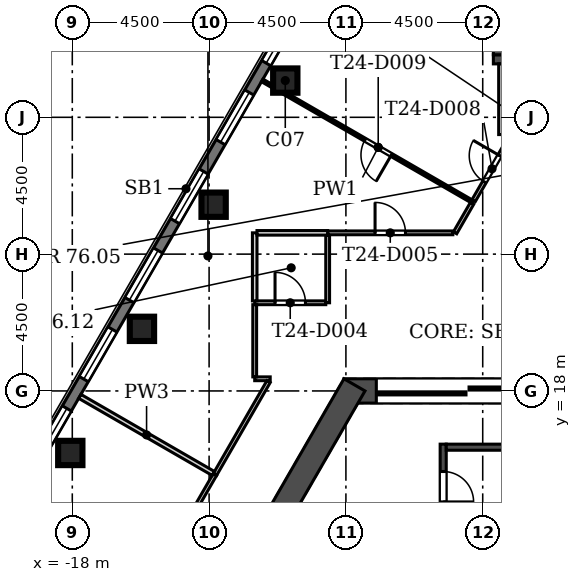
"""IFC4 building model, lengths in metres.
Left out: names, types, materials, properties, quantities, classifications, styles, units other than length and angle.
Written with IfcOpenShell. Run it as: python <this file> out.ifc"""

import sys

from ifc_helpers import new_model, si_unit, direction, frame, frame_2d, origin, origin_2d, place, context, subcontext, project, spatial, rectangle, extrude, element, fill, save


model = new_model("IFC4")
c1 = context("Model", 3, precision=1e-05, world=origin(), true_north=direction((0.0, 1.0)))
c2 = subcontext(c1, "Body", "Model", "MODEL_VIEW")
j1 = project(units=[si_unit("LENGTHUNIT", "METRE"), si_unit("PLANEANGLEUNIT", "RADIAN")], contexts=[c1])
p1 = place(None, origin())
s1 = spatial("IfcSite", under=j1, at=p1, CompositionType="ELEMENT")
p2 = place(p1, origin())
s2 = spatial("IfcBuilding", under=s1, at=p2, CompositionType="ELEMENT")
p3 = place(p2, frame((0.0, 0.0, 335.1)))
s3 = spatial("IfcBuildingStorey", under=s2, at=p3, CompositionType="ELEMENT", Elevation=335.1)
for number, where, z_axis, x_axis in (
    (1, (-10.994, 28.208, 0.0), (0.0, 0.0, 1.0), (1.0, 0.0, 0.0)),
    (2, (-13.352, 24.125, 0.0), (0.0, 0.0, 1.0), (1.0, 0.0, 0.0)),
    (3, (-15.709, 20.042, 0.0), (0.0, 0.0, 1.0), (1.0, 0.0, 0.0)),
    (4, (-18.066, 15.96, 0.0), (0.0, 0.0, 1.0), (1.0, 0.0, 0.0)),
):
    element("IfcColumn", number, at=place(p3, frame(where, z_axis=z_axis, x_axis=x_axis)), inside=s3, PredefinedType="COLUMN", context=c2, shape_type="SweptSolid", body=[
        extrude(rectangle(XDim=0.8, YDim=0.8, at=origin_2d()), origin(), (0.0, 0.0, 1.0), 4.2),
    ])
p4 = place(p3, frame((9.065, 18.0, 0.0), z_axis=(0.0, 0.0, 1.0), x_axis=(-1.0, 0.0, 0.0)))
e5 = element("IfcWall", 5, at=p4, inside=s3, PredefinedType="SHEAR", context=c2, shape_type="SweptSolid", body=[
    extrude(rectangle(XDim=18.13, YDim=0.8, at=frame_2d((9.065, 0.0))), origin(), (0.0, 0.0, 1.0), 4.2),
])
p5 = place(p4, frame((8.365, 0.0, 0.0)))
e6 = element("IfcOpeningElement", 6, at=p5, cuts=e5, PredefinedType="OPENING", context=c2, shape_type="SweptSolid", body=[
    extrude(rectangle(XDim=1.4, YDim=2.1, at=frame_2d((0.7, 1.05))), frame((0.0, 0.41, 0.0), z_axis=(0.0, -1.0, 0.0), x_axis=(1.0, 0.0, 0.0)), (0.0, 0.0, 1.0), 0.82),
])
p6 = place(p4, frame((11.065, 0.0, 0.0)))
e7 = element("IfcOpeningElement", 7, at=p6, cuts=e5, PredefinedType="OPENING", context=c2, shape_type="SweptSolid", body=[
    extrude(rectangle(XDim=6.0, YDim=2.4, at=frame_2d((3.0, 1.2))), frame((0.0, 0.41, 0.0), z_axis=(0.0, -1.0, 0.0), x_axis=(1.0, 0.0, 0.0)), (0.0, 0.0, 1.0), 0.82),
])
p7 = place(p4, frame((1.065, 0.0, 0.0)))
e8 = element("IfcOpeningElement", 8, at=p7, cuts=e5, PredefinedType="OPENING", context=c2, shape_type="SweptSolid", body=[
    extrude(rectangle(XDim=6.0, YDim=2.4, at=frame_2d((3.0, 1.2))), frame((0.0, 0.41, 0.0), z_axis=(0.0, -1.0, 0.0), x_axis=(1.0, 0.0, 0.0)), (0.0, 0.0, 1.0), 0.82),
])
p8 = place(p3, frame((-8.719, 18.2, 0.0), z_axis=(0.0, 0.0, 1.0), x_axis=(-0.500015780397, -0.866016292776, 0.0)))
e9 = element("IfcWall", 9, at=p8, inside=s3, PredefinedType="SHEAR", context=c2, shape_type="SweptSolid", body=[
    extrude(rectangle(XDim=8.67, YDim=0.8, at=frame_2d((4.335, 0.0))), origin(), (0.0, 0.0, 1.0), 4.2),
])
p9 = place(p3, frame((-4.353, 41.372, 0.0), z_axis=(0.0, 0.0, 1.0), x_axis=(-0.500001731347, -0.866024404189, 0.0)))
e10 = element("IfcWall", 10, at=p9, inside=s3, PredefinedType="SOLIDWALL", context=c2, shape_type="SweptSolid", body=[
    extrude(rectangle(XDim=38.87, YDim=0.34, at=frame_2d((19.435, 0.0))), origin(), (0.0, 0.0, 1.0), 3.8),
])
p10 = place(p9, frame((3.653, 0.0, 0.9)))
e11 = element("IfcOpeningElement", 11, at=p10, cuts=e10, PredefinedType="OPENING", context=c2, shape_type="SweptSolid", body=[
    extrude(rectangle(XDim=1.885, YDim=2.6, at=frame_2d((0.942, 1.3))), frame((0.0, 0.18, 0.0), z_axis=(0.0, -1.0, 0.0), x_axis=(1.0, 0.0, 0.0)), (0.0, 0.0, 1.0), 0.36),
])
p11 = place(p9, frame((6.653, 0.0, 0.9)))
e12 = element("IfcOpeningElement", 12, at=p11, cuts=e10, PredefinedType="OPENING", context=c2, shape_type="SweptSolid", body=[
    extrude(rectangle(XDim=1.885, YDim=2.6, at=frame_2d((0.942, 1.3))), frame((0.0, 0.18, 0.0), z_axis=(0.0, -1.0, 0.0), x_axis=(1.0, 0.0, 0.0)), (0.0, 0.0, 1.0), 0.36),
])
p12 = place(p9, frame((9.653, 0.0, 0.9)))
e13 = element("IfcOpeningElement", 13, at=p12, cuts=e10, PredefinedType="OPENING", context=c2, shape_type="SweptSolid", body=[
    extrude(rectangle(XDim=1.885, YDim=2.6, at=frame_2d((0.942, 1.3))), frame((0.0, 0.18, 0.0), z_axis=(0.0, -1.0, 0.0), x_axis=(1.0, 0.0, 0.0)), (0.0, 0.0, 1.0), 0.36),
])
p13 = place(p9, frame((12.653, 0.0, 0.9)))
e14 = element("IfcOpeningElement", 14, at=p13, cuts=e10, PredefinedType="OPENING", context=c2, shape_type="SweptSolid", body=[
    extrude(rectangle(XDim=1.885, YDim=2.6, at=frame_2d((0.942, 1.3))), frame((0.0, 0.18, 0.0), z_axis=(0.0, -1.0, 0.0), x_axis=(1.0, 0.0, 0.0)), (0.0, 0.0, 1.0), 0.36),
])
p14 = place(p9, frame((15.653, 0.0, 0.9)))
e15 = element("IfcOpeningElement", 15, at=p14, cuts=e10, PredefinedType="OPENING", context=c2, shape_type="SweptSolid", body=[
    extrude(rectangle(XDim=1.885, YDim=2.6, at=frame_2d((0.942, 1.3))), frame((0.0, 0.18, 0.0), z_axis=(0.0, -1.0, 0.0), x_axis=(1.0, 0.0, 0.0)), (0.0, 0.0, 1.0), 0.36),
])
p15 = place(p9, frame((18.653, 0.0, 0.9)))
e16 = element("IfcOpeningElement", 16, at=p15, cuts=e10, PredefinedType="OPENING", context=c2, shape_type="SweptSolid", body=[
    extrude(rectangle(XDim=1.885, YDim=2.6, at=frame_2d((0.942, 1.3))), frame((0.0, 0.18, 0.0), z_axis=(0.0, -1.0, 0.0), x_axis=(1.0, 0.0, 0.0)), (0.0, 0.0, 1.0), 0.36),
])
p16 = place(p9, frame((21.653, 0.0, 0.9)))
e17 = element("IfcOpeningElement", 17, at=p16, cuts=e10, PredefinedType="OPENING", context=c2, shape_type="SweptSolid", body=[
    extrude(rectangle(XDim=1.885, YDim=2.6, at=frame_2d((0.942, 1.3))), frame((0.0, 0.18, 0.0), z_axis=(0.0, -1.0, 0.0), x_axis=(1.0, 0.0, 0.0)), (0.0, 0.0, 1.0), 0.36),
])
p17 = place(p9, frame((24.653, 0.0, 0.9)))
e18 = element("IfcOpeningElement", 18, at=p17, cuts=e10, PredefinedType="OPENING", context=c2, shape_type="SweptSolid", body=[
    extrude(rectangle(XDim=1.885, YDim=2.6, at=frame_2d((0.942, 1.3))), frame((0.0, 0.18, 0.0), z_axis=(0.0, -1.0, 0.0), x_axis=(1.0, 0.0, 0.0)), (0.0, 0.0, 1.0), 0.36),
])
p18 = place(p9, frame((27.653, 0.0, 0.9)))
e19 = element("IfcOpeningElement", 19, at=p18, cuts=e10, PredefinedType="OPENING", context=c2, shape_type="SweptSolid", body=[
    extrude(rectangle(XDim=1.885, YDim=2.6, at=frame_2d((0.942, 1.3))), frame((0.0, 0.18, 0.0), z_axis=(0.0, -1.0, 0.0), x_axis=(1.0, 0.0, 0.0)), (0.0, 0.0, 1.0), 0.36),
])
p19 = place(p9, frame((30.653, 0.0, 0.9)))
e20 = element("IfcOpeningElement", 20, at=p19, cuts=e10, PredefinedType="OPENING", context=c2, shape_type="SweptSolid", body=[
    extrude(rectangle(XDim=1.885, YDim=2.6, at=frame_2d((0.942, 1.3))), frame((0.0, 0.18, 0.0), z_axis=(0.0, -1.0, 0.0), x_axis=(1.0, 0.0, 0.0)), (0.0, 0.0, 1.0), 0.36),
])
p20 = place(p9, frame((33.653, 0.0, 0.9)))
e21 = element("IfcOpeningElement", 21, at=p20, cuts=e10, PredefinedType="OPENING", context=c2, shape_type="SweptSolid", body=[
    extrude(rectangle(XDim=1.885, YDim=2.6, at=frame_2d((0.942, 1.3))), frame((0.0, 0.18, 0.0), z_axis=(0.0, -1.0, 0.0), x_axis=(1.0, 0.0, 0.0)), (0.0, 0.0, 1.0), 0.36),
])
p21 = place(p9, frame((1.269, 0.0, 0.9)))
e22 = element("IfcOpeningElement", 22, at=p21, cuts=e10, PredefinedType="OPENING", context=c2, shape_type="SweptSolid", body=[
    extrude(rectangle(XDim=1.115, YDim=2.4, at=frame_2d((0.558, 1.2))), frame((0.0, 0.18, 0.0), z_axis=(0.0, -1.0, 0.0), x_axis=(1.0, 0.0, 0.0)), (0.0, 0.0, 1.0), 0.36),
])
p22 = place(p9, frame((36.646, 0.0, 0.9)))
e23 = element("IfcOpeningElement", 23, at=p22, cuts=e10, PredefinedType="OPENING", context=c2, shape_type="SweptSolid", body=[
    extrude(rectangle(XDim=1.115, YDim=2.4, at=frame_2d((0.558, 1.2))), frame((0.0, 0.18, 0.0), z_axis=(0.0, -1.0, 0.0), x_axis=(1.0, 0.0, 0.0)), (0.0, 0.0, 1.0), 0.36),
])
p23 = place(p3, frame((-5.8, 8.25, -0.4), z_axis=(0.0, 0.0, 1.0), x_axis=(0.0, 1.0, 0.0)))
e24 = element("IfcWall", 24, at=p23, inside=s3, PredefinedType="SOLIDWALL", context=c2, shape_type="SweptSolid", body=[
    extrude(rectangle(XDim=8.0, YDim=0.2, at=frame_2d((4.0, 0.0))), origin(), (0.0, 0.0, 1.0), 4.2),
])
p24 = place(p23, frame((2.2, 0.0, 0.4)))
e25 = element("IfcOpeningElement", 25, at=p24, cuts=e24, PredefinedType="OPENING", context=c2, shape_type="SweptSolid", body=[
    extrude(rectangle(XDim=1.0, YDim=2.1, at=frame_2d((0.5, 1.05))), frame((0.0, 0.11, 0.0), z_axis=(0.0, -1.0, 0.0), x_axis=(1.0, 0.0, 0.0)), (0.0, 0.0, 1.0), 0.22),
])
p25 = place(p23, frame((6.1, 0.0, 0.4)))
e26 = element("IfcOpeningElement", 26, at=p25, cuts=e24, PredefinedType="OPENING", context=c2, shape_type="SweptSolid", body=[
    extrude(rectangle(XDim=1.0, YDim=2.1, at=frame_2d((0.5, 1.05))), frame((0.0, 0.11, 0.0), z_axis=(0.0, -1.0, 0.0), x_axis=(1.0, 0.0, 0.0)), (0.0, 0.0, 1.0), 0.22),
])
p26 = place(p3, frame((-5.7, 16.15, -0.4), z_axis=(0.0, 0.0, 1.0), x_axis=(1.0, 0.0, 0.0)))
e27 = element("IfcWall", 27, at=p26, inside=s3, PredefinedType="SOLIDWALL", context=c2, shape_type="SweptSolid", body=[
    extrude(rectangle(XDim=2.0, YDim=0.2, at=frame_2d((1.0, 0.0))), origin(), (0.0, 0.0, 1.0), 4.2),
])
p27 = place(p3, frame((-4.15, 28.907, -0.4), z_axis=(0.0, 0.0, 1.0), x_axis=(1.0, 0.0, 0.0)))
e28 = element("IfcWall", 28, at=p27, inside=s3, PredefinedType="SOLIDWALL", context=c2, shape_type="SweptSolid", body=[
    extrude(rectangle(XDim=8.3, YDim=0.3, at=frame_2d((4.15, 0.0))), origin(), (0.0, 0.0, 1.0), 4.2),
])
p28 = place(p27, frame((1.55, 0.0, 0.4)))
e29 = element("IfcOpeningElement", 29, at=p28, cuts=e28, PredefinedType="OPENING", context=c2, shape_type="SweptSolid", body=[
    extrude(rectangle(XDim=1.2, YDim=2.1, at=frame_2d((0.6, 1.05))), frame((0.0, 0.16, 0.0), z_axis=(0.0, -1.0, 0.0), x_axis=(1.0, 0.0, 0.0)), (0.0, 0.0, 1.0), 0.32),
])
p29 = place(p3, frame((-4.0, 29.057, -0.4), z_axis=(0.0, 0.0, 1.0), x_axis=(0.0, 1.0, 0.0)))
e30 = element("IfcWall", 30, at=p29, inside=s3, PredefinedType="SOLIDWALL", context=c2, shape_type="SweptSolid", body=[
    extrude(rectangle(XDim=6.5, YDim=0.3, at=frame_2d((3.25, 0.0))), origin(), (0.0, 0.0, 1.0), 4.2),
])
p30 = place(p3, frame((-12.0, 20.9, 0.0), z_axis=(0.0, 0.0, 1.0), x_axis=(1.0, 0.0, 0.0)))
e31 = element("IfcWall", 31, at=p30, inside=s3, PredefinedType="PARTITIONING", context=c2, shape_type="SweptSolid", body=[
    extrude(rectangle(XDim=2.337, YDim=0.125, at=frame_2d((1.169, 0.0))), origin(), (0.0, 0.0, 1.0), 3.8),
])
p31 = place(p30, frame((0.669, 0.0, 0.0)))
e32 = element("IfcOpeningElement", 32, at=p31, cuts=e31, PredefinedType="OPENING", context=c2, shape_type="SweptSolid", body=[
    extrude(rectangle(XDim=1.0, YDim=2.1, at=frame_2d((0.5, 1.05))), frame((0.0, 0.073, 0.0), z_axis=(0.0, -1.0, 0.0), x_axis=(1.0, 0.0, 0.0)), (0.0, 0.0, 1.0), 0.145),
])
p32 = place(p3, frame((-9.6, 20.9, 0.0), z_axis=(0.0, 0.0, 1.0), x_axis=(0.0, 1.0, 0.0)))
e33 = element("IfcWall", 33, at=p32, inside=s3, PredefinedType="PARTITIONING", context=c2, shape_type="SweptSolid", body=[
    extrude(rectangle(XDim=2.225, YDim=0.125, at=frame_2d((1.112, 0.0))), origin(), (0.0, 0.0, 1.0), 3.8),
])
p33 = place(p3, frame((-11.49, 18.4, 0.0), z_axis=(0.0, 0.0, 1.0), x_axis=(-1.0, 0.0, 0.0)))
e34 = element("IfcWall", 34, at=p33, inside=s3, PredefinedType="PARTITIONING", context=c2, shape_type="SweptSolid", body=[
    extrude(rectangle(XDim=0.51, YDim=0.125, at=frame_2d((0.255, 0.0))), origin(), (0.0, 0.0, 1.0), 3.8),
])
p34 = place(p3, frame((-12.0, 18.462, 0.0), z_axis=(0.0, 0.0, 1.0), x_axis=(0.0, 1.0, 0.0)))
e35 = element("IfcWall", 35, at=p34, inside=s3, PredefinedType="PARTITIONING", context=c2, shape_type="SweptSolid", body=[
    extrude(rectangle(XDim=2.375, YDim=0.125, at=frame_2d((1.187, 0.0))), origin(), (0.0, 0.0, 1.0), 3.8),
])
p35 = place(p3, frame((-9.6, 23.2, 0.0), z_axis=(0.0, 0.0, 1.0), x_axis=(1.0, 0.0, 0.0)))
e36 = element("IfcWall", 36, at=p35, inside=s3, PredefinedType="PARTITIONING", context=c2, shape_type="SweptSolid", body=[
    extrude(rectangle(XDim=4.118, YDim=0.125, at=frame_2d((2.059, 0.0))), origin(), (0.0, 0.0, 1.0), 3.8),
])
p36 = place(p35, frame((1.559, 0.0, 0.0)))
e37 = element("IfcOpeningElement", 37, at=p36, cuts=e36, PredefinedType="OPENING", context=c2, shape_type="SweptSolid", body=[
    extrude(rectangle(XDim=1.0, YDim=2.1, at=frame_2d((0.5, 1.05))), frame((0.0, 0.073, 0.0), z_axis=(0.0, -1.0, 0.0), x_axis=(1.0, 0.0, 0.0)), (0.0, 0.0, 1.0), 0.145),
])
p37 = place(p3, frame((-13.306, 15.254, 0.0), z_axis=(0.0, 0.0, 1.0), x_axis=(0.499984357326, 0.866034434898, 0.0)))
e38 = element("IfcWall", 38, at=p37, inside=s3, PredefinedType="PARTITIONING", context=c2, shape_type="SweptSolid", body=[
    extrude(rectangle(XDim=3.523, YDim=0.125, at=frame_2d((1.762, 0.0))), origin(), (0.0, 0.0, 1.0), 3.8),
])
p38 = place(p3, frame((-15.5, 11.455, 0.0), z_axis=(0.0, 0.0, 1.0), x_axis=(0.500005024956, 0.866022502605, 0.0)))
e39 = element("IfcWall", 39, at=p38, inside=s3, PredefinedType="PARTITIONING", context=c2, shape_type="SweptSolid", body=[
    extrude(rectangle(XDim=4.388, YDim=0.125, at=frame_2d((2.194, 0.0))), origin(), (0.0, 0.0, 1.0), 3.8),
])
p39 = place(p3, frame((-3.9, 26.432, 0.0), z_axis=(0.0, 0.0, 1.0), x_axis=(0.0, 1.0, 0.0)))
e40 = element("IfcWall", 40, at=p39, inside=s3, PredefinedType="PARTITIONING", context=c2, shape_type="SweptSolid", body=[
    extrude(rectangle(XDim=2.325, YDim=0.15, at=frame_2d((1.163, 0.0))), origin(), (0.0, 0.0, 1.0), 3.8),
])
p40 = place(p3, frame((-4.8, 24.258, 0.0), z_axis=(0.0, 0.0, 1.0), x_axis=(0.499995647607, 0.866027916625, 0.0)))
e41 = element("IfcWall", 41, at=p40, inside=s3, PredefinedType="PARTITIONING", context=c2, shape_type="SweptSolid", body=[
    extrude(rectangle(XDim=2.424, YDim=0.125, at=frame_2d((1.212, 0.0))), origin(), (0.0, 0.0, 1.0), 3.8),
])
p41 = place(p40, frame((0.712, 0.0, 0.0)))
e42 = element("IfcOpeningElement", 42, at=p41, cuts=e41, PredefinedType="OPENING", context=c2, shape_type="SweptSolid", body=[
    extrude(rectangle(XDim=1.0, YDim=2.1, at=frame_2d((0.5, 1.05))), frame((0.0, 0.073, 0.0), z_axis=(0.0, -1.0, 0.0), x_axis=(1.0, 0.0, 0.0)), (0.0, 0.0, 1.0), 0.145),
])
p42 = place(p3, frame((-5.41, 23.2, 0.0), z_axis=(0.0, 0.0, 1.0), x_axis=(0.500005339912, 0.866022320763, 0.0)))
e43 = element("IfcWall", 43, at=p42, inside=s3, PredefinedType="PARTITIONING", context=c2, shape_type="SweptSolid", body=[
    extrude(rectangle(XDim=1.121, YDim=0.125, at=frame_2d((0.56, 0.0))), origin(), (0.0, 0.0, 1.0), 3.8),
])
p43 = place(p3, frame((-4.825, 24.214, 0.0), z_axis=(0.0, 0.0, 1.0), x_axis=(-0.866037970569, 0.499978233058, 0.0)))
e44 = element("IfcWall", 44, at=p43, inside=s3, PredefinedType="PARTITIONING", context=c2, shape_type="SweptSolid", body=[
    extrude(rectangle(XDim=7.188, YDim=0.1, at=frame_2d((3.594, 0.0))), origin(), (0.0, 0.0, 1.0), 3.8),
])
p44 = place(p43, frame((3.094, 0.0, 0.0)))
e45 = element("IfcOpeningElement", 45, at=p44, cuts=e44, PredefinedType="OPENING", context=c2, shape_type="SweptSolid", body=[
    extrude(rectangle(XDim=1.0, YDim=2.1, at=frame_2d((0.5, 1.05))), frame((0.0, 0.06, 0.0), z_axis=(0.0, -1.0, 0.0), x_axis=(1.0, 0.0, 0.0)), (0.0, 0.0, 1.0), 0.12),
])
p45 = place(p3, frame((-11.394, 28.007, 0.0), z_axis=(0.0, 0.0, 1.0), x_axis=(-0.865950118807, 0.50013037474, 0.0)))
e46 = element("IfcWall", 46, at=p45, inside=s3, PredefinedType="PARTITIONING", context=c2, shape_type="SweptSolid", body=[
    extrude(rectangle(XDim=0.415, YDim=0.1, at=frame_2d((0.207, 0.0))), origin(), (0.0, 0.0, 1.0), 3.8),
])
p46 = place(p3, frame((-12.0, 20.963, 0.0), z_axis=(0.0, 0.0, 1.0), x_axis=(0.0, 1.0, 0.0)))
e47 = element("IfcWall", 47, at=p46, inside=s3, PredefinedType="PARTITIONING", context=c2, shape_type="SweptSolid", body=[
    extrude(rectangle(XDim=2.237, YDim=0.15, at=frame_2d((1.119, 0.0))), origin(), (0.0, 0.0, 1.0), 3.8),
])
p47 = place(p3, frame((-11.925, 23.2, 0.0), z_axis=(0.0, 0.0, 1.0), x_axis=(1.0, 0.0, 0.0)))
e48 = element("IfcWall", 48, at=p47, inside=s3, PredefinedType="PARTITIONING", context=c2, shape_type="SweptSolid", body=[
    extrude(rectangle(XDim=2.325, YDim=0.15, at=frame_2d((1.163, 0.0))), origin(), (0.0, 0.0, 1.0), 3.8),
])
p48 = place(p3, frame((-13.36, 15.285, 0.0), z_axis=(0.0, 0.0, 1.0), x_axis=(-0.86601005171, 0.50002658963, 0.0)))
e49 = element("IfcWall", 49, at=p48, inside=s3, PredefinedType="PARTITIONING", context=c2, shape_type="SweptSolid", body=[
    extrude(rectangle(XDim=5.073, YDim=0.15, at=frame_2d((2.536, 0.0))), origin(), (0.0, 0.0, 1.0), 3.8),
])
p49 = place(p13, origin())
e50 = element("IfcWindow", 50, at=p49, inside=s3, PartitioningType="SINGLE_PANEL", PredefinedType="WINDOW", context=c2, shape_type="SweptSolid", body=[
    extrude(rectangle(XDim=1.885, YDim=2.6, at=frame_2d((0.942, 1.3))), frame((0.0, 0.11, 0.0), z_axis=(0.0, -1.0, 0.0), x_axis=(1.0, 0.0, 0.0)), (0.0, 0.0, 1.0), 0.06),
])
fill(e14, e50)
p50 = place(p14, origin())
e51 = element("IfcWindow", 51, at=p50, inside=s3, PartitioningType="SINGLE_PANEL", PredefinedType="WINDOW", context=c2, shape_type="SweptSolid", body=[
    extrude(rectangle(XDim=1.885, YDim=2.6, at=frame_2d((0.942, 1.3))), frame((0.0, 0.11, 0.0), z_axis=(0.0, -1.0, 0.0), x_axis=(1.0, 0.0, 0.0)), (0.0, 0.0, 1.0), 0.06),
])
fill(e15, e51)
p51 = place(p15, origin())
e52 = element("IfcWindow", 52, at=p51, inside=s3, PartitioningType="SINGLE_PANEL", PredefinedType="WINDOW", context=c2, shape_type="SweptSolid", body=[
    extrude(rectangle(XDim=1.885, YDim=2.6, at=frame_2d((0.942, 1.3))), frame((0.0, 0.11, 0.0), z_axis=(0.0, -1.0, 0.0), x_axis=(1.0, 0.0, 0.0)), (0.0, 0.0, 1.0), 0.06),
])
fill(e16, e52)
p52 = place(p16, origin())
e53 = element("IfcWindow", 53, at=p52, inside=s3, PartitioningType="SINGLE_PANEL", PredefinedType="WINDOW", context=c2, shape_type="SweptSolid", body=[
    extrude(rectangle(XDim=1.885, YDim=2.6, at=frame_2d((0.942, 1.3))), frame((0.0, 0.11, 0.0), z_axis=(0.0, -1.0, 0.0), x_axis=(1.0, 0.0, 0.0)), (0.0, 0.0, 1.0), 0.06),
])
fill(e17, e53)
p53 = place(p17, origin())
e54 = element("IfcWindow", 54, at=p53, inside=s3, PartitioningType="SINGLE_PANEL", PredefinedType="WINDOW", context=c2, shape_type="SweptSolid", body=[
    extrude(rectangle(XDim=1.885, YDim=2.6, at=frame_2d((0.942, 1.3))), frame((0.0, 0.11, 0.0), z_axis=(0.0, -1.0, 0.0), x_axis=(1.0, 0.0, 0.0)), (0.0, 0.0, 1.0), 0.06),
])
fill(e18, e54)
p54 = place(p18, origin())
e55 = element("IfcWindow", 55, at=p54, inside=s3, PartitioningType="SINGLE_PANEL", PredefinedType="WINDOW", context=c2, shape_type="SweptSolid", body=[
    extrude(rectangle(XDim=1.885, YDim=2.6, at=frame_2d((0.942, 1.3))), frame((0.0, 0.11, 0.0), z_axis=(0.0, -1.0, 0.0), x_axis=(1.0, 0.0, 0.0)), (0.0, 0.0, 1.0), 0.06),
])
fill(e19, e55)
p55 = place(p25, frame((1.0, 0.0, 0.0), z_axis=(0.0, 0.0, 1.0), x_axis=(-1.0, 0.0, 0.0)))
e56 = element("IfcDoor", 56, at=p55, inside=s3, OperationType="SINGLE_SWING_RIGHT", PredefinedType="DOOR", context=c2, shape_type="SweptSolid", body=[
    extrude(rectangle(XDim=1.0, YDim=2.1, at=frame_2d((0.5, 1.05))), frame((0.0, 0.025, 0.0), z_axis=(0.0, -1.0, 0.0), x_axis=(1.0, 0.0, 0.0)), (0.0, 0.0, 1.0), 0.05),
])
fill(e26, e56)
p56 = place(p6, origin())
e57 = element("IfcDoor", 57, at=p56, inside=s3, OperationType="DOUBLE_DOOR_SLIDING", PredefinedType="DOOR", context=c2, shape_type="SweptSolid", body=[
    extrude(rectangle(XDim=6.0, YDim=2.4, at=frame_2d((3.0, 1.2))), frame((0.0, 0.025, 0.0), z_axis=(0.0, -1.0, 0.0), x_axis=(1.0, 0.0, 0.0)), (0.0, 0.0, 1.0), 0.05),
])
fill(e7, e57)
p57 = place(p31, origin())
e58 = element("IfcDoor", 58, at=p57, inside=s3, OperationType="SINGLE_SWING_LEFT", PredefinedType="DOOR", context=c2, shape_type="SweptSolid", body=[
    extrude(rectangle(XDim=1.0, YDim=2.1, at=frame_2d((0.5, 1.05))), frame((0.0, 0.025, 0.0), z_axis=(0.0, -1.0, 0.0), x_axis=(1.0, 0.0, 0.0)), (0.0, 0.0, 1.0), 0.05),
])
fill(e32, e58)
p58 = place(p36, origin())
e59 = element("IfcDoor", 59, at=p58, inside=s3, OperationType="SINGLE_SWING_LEFT", PredefinedType="DOOR", context=c2, shape_type="SweptSolid", body=[
    extrude(rectangle(XDim=1.0, YDim=2.1, at=frame_2d((0.5, 1.05))), frame((0.0, 0.025, 0.0), z_axis=(0.0, -1.0, 0.0), x_axis=(1.0, 0.0, 0.0)), (0.0, 0.0, 1.0), 0.05),
])
fill(e37, e59)
p59 = place(p41, origin())
e60 = element("IfcDoor", 60, at=p59, inside=s3, OperationType="SINGLE_SWING_RIGHT", PredefinedType="DOOR", context=c2, shape_type="SweptSolid", body=[
    extrude(rectangle(XDim=1.0, YDim=2.1, at=frame_2d((0.5, 1.05))), frame((0.0, 0.025, 0.0), z_axis=(0.0, -1.0, 0.0), x_axis=(1.0, 0.0, 0.0)), (0.0, 0.0, 1.0), 0.05),
])
fill(e42, e60)
p60 = place(p44, origin())
e61 = element("IfcDoor", 61, at=p60, inside=s3, OperationType="SINGLE_SWING_LEFT", PredefinedType="DOOR", context=c2, shape_type="SweptSolid", body=[
    extrude(rectangle(XDim=1.0, YDim=2.1, at=frame_2d((0.5, 1.05))), frame((0.0, 0.025, 0.0), z_axis=(0.0, -1.0, 0.0), x_axis=(1.0, 0.0, 0.0)), (0.0, 0.0, 1.0), 0.05),
])
fill(e45, e61)
save(model, sys.argv[1])
